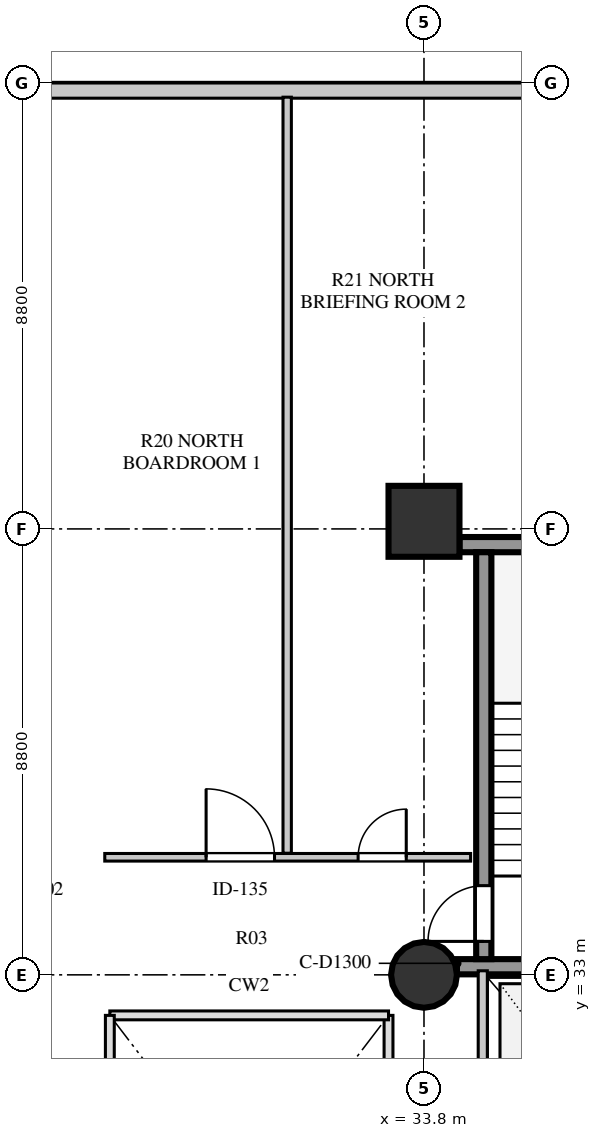
"""IFC4 building model, lengths in metres.
Left out: names, types, materials, properties, quantities, classifications, styles, units other than length and angle.
Written with IfcOpenShell. Run it as: python <this file> out.ifc"""

import sys

from ifc_helpers import new_model, si_unit, direction, frame, frame_2d, origin, origin_2d, place, context, subcontext, project, spatial, rectangle, circle, extrude, element, fill, save


model = new_model("IFC4")
c1 = context("Model", 3, precision=1e-05, world=origin(), true_north=direction((0.0, 1.0)))
c2 = subcontext(c1, "Body", "Model", "MODEL_VIEW")
j1 = project(units=[si_unit("LENGTHUNIT", "METRE"), si_unit("PLANEANGLEUNIT", "RADIAN")], contexts=[c1])
p1 = place(None, origin())
s1 = spatial("IfcSite", under=j1, at=p1, CompositionType="ELEMENT")
p2 = place(p1, origin())
s2 = spatial("IfcBuilding", under=s1, at=p2, CompositionType="ELEMENT")
p3 = place(p2, frame((0.0, 0.0, 21.5)))
s3 = spatial("IfcBuildingStorey", under=s2, at=p3, CompositionType="ELEMENT", Elevation=21.5)
p4 = place(p3, frame((34.45, 33.16, 0.0), z_axis=(0.0, 0.0, 1.0), x_axis=(1.0, 0.0, 0.0)))
e1 = element("IfcWall", 1, at=p4, inside=s3, PredefinedType="SHEAR", context=c2, shape_type="SweptSolid", body=[
    extrude(rectangle(XDim=4.42, YDim=0.3, at=frame_2d((2.21, 0.0))), origin(), (0.0, 0.0, 1.0), 4.22),
])
p5 = place(p3, frame((34.5, 41.49, 0.0), z_axis=(0.0, 0.0, 1.0), x_axis=(1.0, 0.0, 0.0)))
e2 = element("IfcWall", 2, at=p5, inside=s3, PredefinedType="SHEAR", context=c2, shape_type="SweptSolid", body=[
    extrude(rectangle(XDim=4.37, YDim=0.3, at=frame_2d((2.185, 0.0))), origin(), (0.0, 0.0, 1.0), 4.22),
])
p6 = place(p3, frame((34.98, 33.31, 0.0), z_axis=(0.0, 0.0, 1.0), x_axis=(0.0, 1.0, 0.0)))
e3 = element("IfcWall", 3, at=p6, inside=s3, PredefinedType="SHEAR", context=c2, shape_type="SweptSolid", body=[
    extrude(rectangle(XDim=8.03, YDim=0.3, at=frame_2d((4.015, 0.0))), origin(), (0.0, 0.0, 1.0), 4.22),
])
p7 = place(p6, frame((0.35, 0.0, 0.0)))
e4 = element("IfcOpeningElement", 4, at=p7, cuts=e3, PredefinedType="OPENING", context=c2, shape_type="SweptSolid", body=[
    extrude(rectangle(XDim=1.1, YDim=2.1, at=frame_2d((0.55, 1.05))), frame((0.0, 0.16, 0.0), z_axis=(0.0, -1.0, 0.0), x_axis=(1.0, 0.0, 0.0)), (0.0, 0.0, 1.0), 0.32),
])
p8 = place(p3, frame((33.8, 33.0, 0.0), z_axis=(0.0, 0.0, 1.0), x_axis=(1.0, 0.0, 0.0)))
e5 = element("IfcColumn", 5, at=p8, inside=s3, PredefinedType="COLUMN", context=c2, shape_type="SweptSolid", body=[
    extrude(circle(Radius=0.65, at=origin_2d()), origin(), (0.0, 0.0, 1.0), 4.22),
])
p9 = place(p3, frame((33.8, 41.95, 0.0), z_axis=(0.0, 0.0, 1.0), x_axis=(1.0, 0.0, 0.0)))
e6 = element("IfcColumn", 6, at=p9, inside=s3, PredefinedType="COLUMN", context=c2, shape_type="SweptSolid", body=[
    extrude(rectangle(XDim=1.4, YDim=1.4, at=origin_2d()), origin(), (0.0, 0.0, 1.0), 4.22),
])
p10 = place(p3, frame((46.3, 50.45, 0.0), z_axis=(0.0, 0.0, 1.0), x_axis=(-1.0, 0.0, 0.0)))
e7 = element("IfcWall", 7, at=p10, inside=s3, PredefinedType="STANDARD", context=c2, shape_type="SweptSolid", body=[
    extrude(rectangle(XDim=34.0, YDim=0.3, at=frame_2d((17.0, 0.0))), origin(), (0.0, 0.0, 1.0), 4.22),
])
p11 = place(p10, frame((23.495, 0.0, 0.8)))
e8 = element("IfcOpeningElement", 8, at=p11, cuts=e7, PredefinedType="OPENING", context=c2, shape_type="SweptSolid", body=[
    extrude(rectangle(XDim=2.1, YDim=1.95, at=frame_2d((1.05, 0.975))), frame((0.0, 0.16, 0.0), z_axis=(0.0, -1.0, 0.0), x_axis=(1.0, 0.0, 0.0)), (0.0, 0.0, 1.0), 0.32),
])
p12 = place(p10, frame((6.98, 0.0, 0.8)))
e9 = element("IfcOpeningElement", 9, at=p12, cuts=e7, PredefinedType="OPENING", context=c2, shape_type="SweptSolid", body=[
    extrude(rectangle(XDim=1.35, YDim=1.9, at=frame_2d((0.675, 0.95))), frame((0.0, 0.16, 0.0), z_axis=(0.0, -1.0, 0.0), x_axis=(1.0, 0.0, 0.0)), (0.0, 0.0, 1.0), 0.32),
])
p13 = place(p3, frame((34.96, 28.86, 0.0), z_axis=(0.0, 0.0, 1.0), x_axis=(0.0, 1.0, 0.0)))
e10 = element("IfcWall", 10, at=p13, inside=s3, PredefinedType="SOLIDWALL", context=c2, shape_type="SweptSolid", body=[
    extrude(rectangle(XDim=4.22, YDim=0.18, at=frame_2d((2.11, 0.0))), origin(), (0.0, 0.0, 1.0), 4.22),
])
p14 = place(p3, frame((27.5, 35.32, 0.0), z_axis=(0.0, 0.0, 1.0), x_axis=(1.0, 0.0, 0.0)))
e11 = element("IfcWall", 11, at=p14, inside=s3, PredefinedType="PARTITIONING", context=c2, shape_type="SweptSolid", body=[
    extrude(rectangle(XDim=7.22, YDim=0.15, at=frame_2d((3.61, 0.0))), origin(), (0.0, 0.0, 1.0), 4.22),
])
p15 = place(p14, frame((5.0, 0.0, 0.0)))
e12 = element("IfcOpeningElement", 12, at=p15, cuts=e11, PredefinedType="OPENING", context=c2, shape_type="SweptSolid", body=[
    extrude(rectangle(XDim=0.95, YDim=2.08, at=frame_2d((0.475, 1.04))), frame((0.0, 0.085, 0.0), z_axis=(0.0, -1.0, 0.0), x_axis=(1.0, 0.0, 0.0)), (0.0, 0.0, 1.0), 0.17),
])
p16 = place(p14, frame((2.0, 0.0, 0.0)))
e13 = element("IfcOpeningElement", 13, at=p16, cuts=e11, PredefinedType="OPENING", context=c2, shape_type="SweptSolid", body=[
    extrude(rectangle(XDim=1.35, YDim=2.1, at=frame_2d((0.675, 1.05))), frame((0.0, 0.085, 0.0), z_axis=(0.0, -1.0, 0.0), x_axis=(1.0, 0.0, 0.0)), (0.0, 0.0, 1.0), 0.17),
])
p17 = place(p3, frame((31.1, 35.4, 0.0), z_axis=(0.0, 0.0, 1.0), x_axis=(0.0, 1.0, 0.0)))
e14 = element("IfcWall", 14, at=p17, inside=s3, PredefinedType="PARTITIONING", context=c2, shape_type="SweptSolid", body=[
    extrude(rectangle(XDim=14.92, YDim=0.165, at=frame_2d((7.46, 0.0))), origin(), (0.0, 0.0, 1.0), 4.22),
])
p18 = place(p7, origin())
e15 = element("IfcDoor", 15, at=p18, inside=s3, OperationType="SINGLE_SWING_LEFT", PredefinedType="DOOR", context=c2, shape_type="SweptSolid", body=[
    extrude(rectangle(XDim=1.1, YDim=2.1, at=frame_2d((0.55, 1.05))), frame((0.0, 0.025, 0.0), z_axis=(0.0, -1.0, 0.0), x_axis=(1.0, 0.0, 0.0)), (0.0, 0.0, 1.0), 0.05),
])
fill(e4, e15)
p19 = place(p15, origin())
e16 = element("IfcDoor", 16, at=p19, inside=s3, OperationType="SINGLE_SWING_RIGHT", PredefinedType="DOOR", context=c2, shape_type="SweptSolid", body=[
    extrude(rectangle(XDim=0.95, YDim=2.08, at=frame_2d((0.475, 1.04))), frame((0.0, 0.025, 0.0), z_axis=(0.0, -1.0, 0.0), x_axis=(1.0, 0.0, 0.0)), (0.0, 0.0, 1.0), 0.05),
])
fill(e12, e16)
p20 = place(p16, origin())
e17 = element("IfcDoor", 17, at=p20, inside=s3, OperationType="SINGLE_SWING_LEFT", PredefinedType="DOOR", context=c2, shape_type="SweptSolid", body=[
    extrude(rectangle(XDim=1.35, YDim=2.1, at=frame_2d((0.675, 1.05))), frame((0.0, 0.025, 0.0), z_axis=(0.0, -1.0, 0.0), x_axis=(1.0, 0.0, 0.0)), (0.0, 0.0, 1.0), 0.05),
])
fill(e13, e17)
save(model, sys.argv[1])
